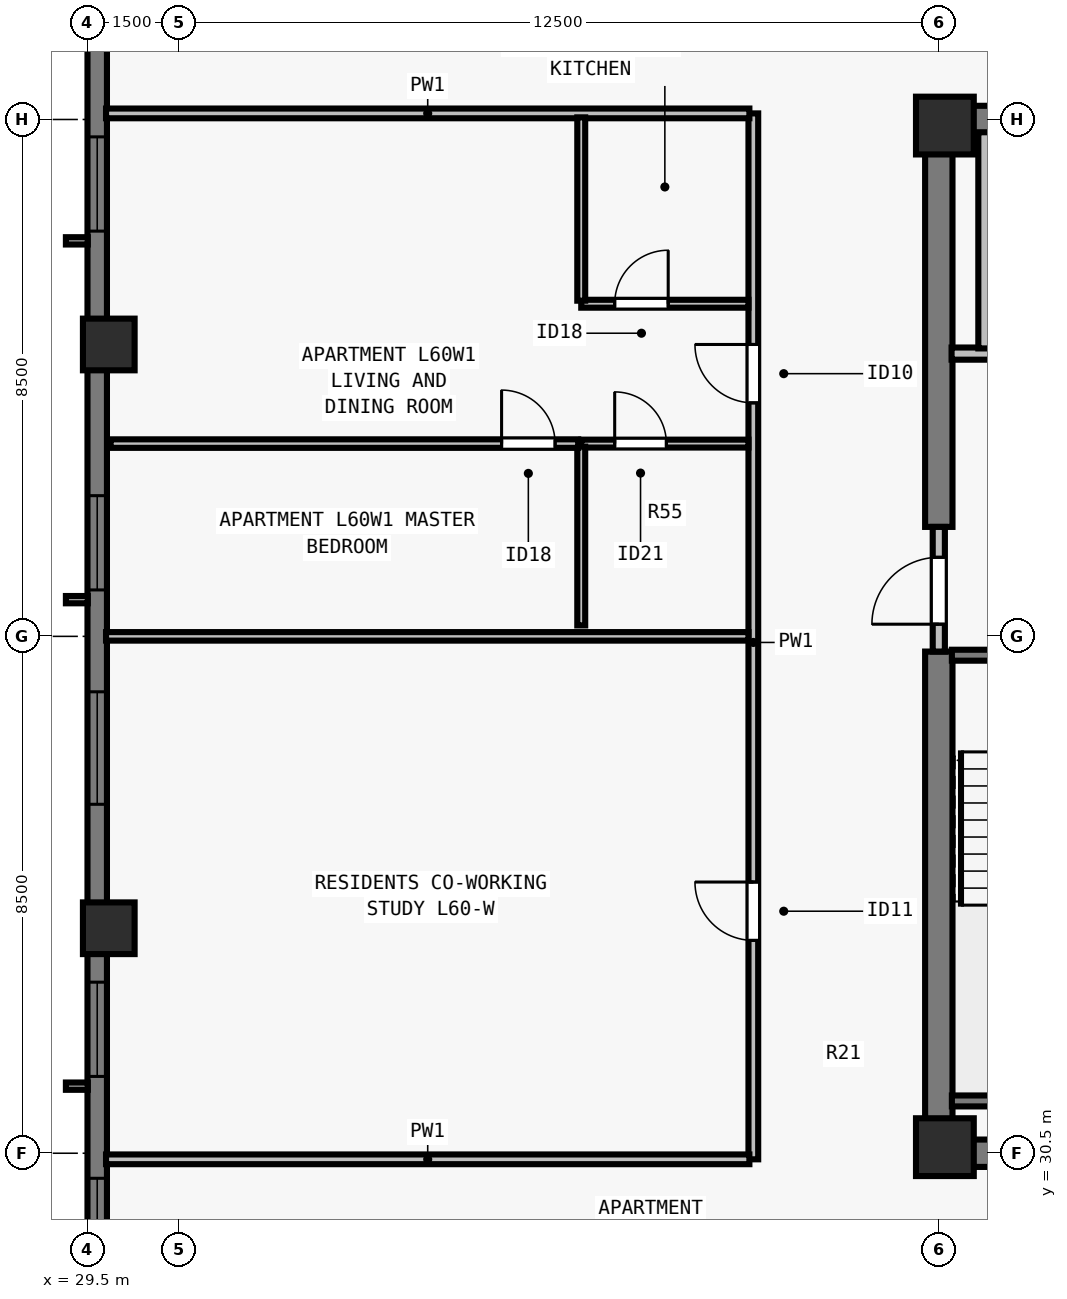
"""IFC4 building model, lengths in metres.
Left out: names, types, materials, properties, quantities, classifications, styles, units other than length and angle.
Written with IfcOpenShell. Run it as: python <this file> out.ifc"""

import sys

from ifc_helpers import new_model, si_unit, direction, frame, frame_2d, origin, origin_2d, place, context, subcontext, project, spatial, rectangle, extrude, element, fill, save


model = new_model("IFC4")
c1 = context("Model", 3, precision=1e-05, world=origin(), true_north=direction((0.0, 1.0)))
c2 = subcontext(c1, "Body", "Model", "MODEL_VIEW")
j1 = project(units=[si_unit("LENGTHUNIT", "METRE"), si_unit("PLANEANGLEUNIT", "RADIAN")], contexts=[c1])
p1 = place(None, origin())
s1 = spatial("IfcSite", under=j1, at=p1, CompositionType="ELEMENT")
p2 = place(p1, origin())
s2 = spatial("IfcBuilding", under=s1, at=p2, CompositionType="ELEMENT")
p3 = place(p2, frame((0.0, 0.0, 220.0)))
s3 = spatial("IfcBuildingStorey", under=s2, at=p3, CompositionType="ELEMENT", Elevation=220.0)
for number, where, z_axis, x_axis in (
    (1, (43.6, 30.6, 0.0), (0.0, 0.0, 1.0), (1.0, 0.0, 0.0)),
    (2, (43.6, 47.4, 0.0), (0.0, 0.0, 1.0), (1.0, 0.0, 0.0)),
):
    element("IfcColumn", number, at=place(p3, frame(where, z_axis=z_axis, x_axis=x_axis)), inside=s3, PredefinedType="COLUMN", context=c2, shape_type="SweptSolid", body=[
        extrude(rectangle(XDim=0.95, YDim=0.95, at=origin_2d()), origin(), (0.0, 0.0, 1.0), 3.5),
    ])
for number, where, z_axis, x_axis in (
    (3, (29.85, 43.8, 0.0), (0.0, 0.0, 1.0), (0.0, 1.0, 0.0)),
    (4, (29.85, 34.2, 0.0), (0.0, 0.0, 1.0), (0.0, 1.0, 0.0)),
):
    element("IfcColumn", number, at=place(p3, frame(where, z_axis=z_axis, x_axis=x_axis)), inside=s3, PredefinedType="COLUMN", context=c2, shape_type="SweptSolid", body=[
        extrude(rectangle(XDim=0.85, YDim=0.85, at=origin_2d()), origin(), (0.0, 0.0, 1.0), 3.5),
    ])
p4 = place(p3, frame((29.66, 21.5, 0.0), z_axis=(0.0, 0.0, 1.0), x_axis=(0.0, 1.0, 0.0)))
e5 = element("IfcWall", 5, at=p4, inside=s3, PredefinedType="SOLIDWALL", context=c2, shape_type="SweptSolid", body=[
    extrude(rectangle(XDim=34.702, YDim=0.32, at=frame_2d((17.351, 0.0))), origin(), (0.0, 0.0, 1.0), 3.29),
])
p5 = place(p4, frame((4.312, 0.0, 0.8)))
e6 = element("IfcOpeningElement", 6, at=p5, cuts=e5, PredefinedType="OPENING", context=c2, shape_type="SweptSolid", body=[
    extrude(rectangle(XDim=1.55, YDim=1.678, at=frame_2d((0.775, 0.839))), frame((0.0, 0.17, 0.0), z_axis=(0.0, -1.0, 0.0), x_axis=(1.0, 0.0, 0.0)), (0.0, 0.0, 1.0), 0.34),
])
p6 = place(p4, frame((6.738, 0.0, 0.8)))
e7 = element("IfcOpeningElement", 7, at=p6, cuts=e5, PredefinedType="OPENING", context=c2, shape_type="SweptSolid", body=[
    extrude(rectangle(XDim=1.85, YDim=1.678, at=frame_2d((0.925, 0.839))), frame((0.0, 0.17, 0.0), z_axis=(0.0, -1.0, 0.0), x_axis=(1.0, 0.0, 0.0)), (0.0, 0.0, 1.0), 0.34),
])
p7 = place(p4, frame((10.263, 0.0, 0.8)))
e8 = element("IfcOpeningElement", 8, at=p7, cuts=e5, PredefinedType="OPENING", context=c2, shape_type="SweptSolid", body=[
    extrude(rectangle(XDim=1.55, YDim=1.678, at=frame_2d((0.775, 0.839))), frame((0.0, 0.17, 0.0), z_axis=(0.0, -1.0, 0.0), x_axis=(1.0, 0.0, 0.0)), (0.0, 0.0, 1.0), 0.34),
])
p8 = place(p4, frame((14.738, 0.0, 0.8)))
e9 = element("IfcOpeningElement", 9, at=p8, cuts=e5, PredefinedType="OPENING", context=c2, shape_type="SweptSolid", body=[
    extrude(rectangle(XDim=1.85, YDim=1.678, at=frame_2d((0.925, 0.839))), frame((0.0, 0.17, 0.0), z_axis=(0.0, -1.0, 0.0), x_axis=(1.0, 0.0, 0.0)), (0.0, 0.0, 1.0), 0.34),
])
p9 = place(p4, frame((18.264, 0.0, 0.8)))
e10 = element("IfcOpeningElement", 10, at=p9, cuts=e5, PredefinedType="OPENING", context=c2, shape_type="SweptSolid", body=[
    extrude(rectangle(XDim=1.55, YDim=1.678, at=frame_2d((0.775, 0.839))), frame((0.0, 0.17, 0.0), z_axis=(0.0, -1.0, 0.0), x_axis=(1.0, 0.0, 0.0)), (0.0, 0.0, 1.0), 0.34),
])
p10 = place(p4, frame((24.164, 0.0, 0.8)))
e11 = element("IfcOpeningElement", 11, at=p10, cuts=e5, PredefinedType="OPENING", context=c2, shape_type="SweptSolid", body=[
    extrude(rectangle(XDim=1.55, YDim=1.678, at=frame_2d((0.775, 0.839))), frame((0.0, 0.17, 0.0), z_axis=(0.0, -1.0, 0.0), x_axis=(1.0, 0.0, 0.0)), (0.0, 0.0, 1.0), 0.34),
])
for number, where, z_axis, x_axis in (
    (12, (43.275, 30.5, 0.0), (0.0, 0.0, 1.0), (1.0, 0.0, 0.0)),
    (13, (43.275, 47.5, 0.0), (0.0, 0.0, 1.0), (1.0, 0.0, 0.0)),
):
    element("IfcWall", number, at=place(p3, frame(where, z_axis=z_axis, x_axis=x_axis)), inside=s3, PredefinedType="SHEAR", context=c2, shape_type="SweptSolid", body=[
        extrude(rectangle(XDim=17.45, YDim=0.45, at=frame_2d((8.725, 0.0))), origin(), (0.0, 0.0, 1.0), 3.29),
    ])
p11 = place(p3, frame((43.5, 30.715, 0.0), z_axis=(0.0, 0.0, 1.0), x_axis=(0.0, 1.0, 0.0)))
e14 = element("IfcWall", 14, at=p11, inside=s3, PredefinedType="SHEAR", context=c2, shape_type="SweptSolid", body=[
    extrude(rectangle(XDim=8.035, YDim=0.45, at=frame_2d((4.018, 0.0))), origin(), (0.0, 0.0, 1.0), 3.29),
])
p12 = place(p3, frame((43.5, 40.8, 0.0), z_axis=(0.0, 0.0, 1.0), x_axis=(0.0, 1.0, 0.0)))
e15 = element("IfcWall", 15, at=p12, inside=s3, PredefinedType="SHEAR", context=c2, shape_type="SweptSolid", body=[
    extrude(rectangle(XDim=6.485, YDim=0.45, at=frame_2d((3.242, 0.0))), origin(), (0.0, 0.0, 1.0), 3.29),
])
p13 = place(p3, frame((43.5, 38.75, 0.0), z_axis=(0.0, 0.0, 1.0), x_axis=(0.0, 1.0, 0.0)))
e16 = element("IfcWall", 16, at=p13, inside=s3, PredefinedType="SOLIDWALL", context=c2, shape_type="SweptSolid", body=[
    extrude(rectangle(XDim=2.05, YDim=0.2, at=frame_2d((1.025, 0.0))), origin(), (0.0, 0.0, 1.0), 3.29),
])
p14 = place(p13, frame((0.45, 0.0, 0.0)))
e17 = element("IfcOpeningElement", 17, at=p14, cuts=e16, PredefinedType="OPENING", context=c2, shape_type="SweptSolid", body=[
    extrude(rectangle(XDim=1.1, YDim=2.15, at=frame_2d((0.55, 1.075))), frame((0.0, 0.11, 0.0), z_axis=(0.0, -1.0, 0.0), x_axis=(1.0, 0.0, 0.0)), (0.0, 0.0, 1.0), 0.22),
])
p15 = place(p3, frame((43.71, 43.65, 0.0), z_axis=(0.0, 0.0, 1.0), x_axis=(1.0, 0.0, 0.0)))
e18 = element("IfcWall", 18, at=p15, inside=s3, PredefinedType="SOLIDWALL", context=c2, shape_type="SweptSolid", body=[
    extrude(rectangle(XDim=3.555, YDim=0.2, at=frame_2d((1.777, 0.0))), origin(), (0.0, 0.0, 1.0), 3.29),
])
p16 = place(p15, frame((1.16, 0.0, 0.0)))
e19 = element("IfcOpeningElement", 19, at=p16, cuts=e18, PredefinedType="OPENING", context=c2, shape_type="SweptSolid", body=[
    extrude(rectangle(XDim=1.1, YDim=2.2, at=frame_2d((0.55, 1.1))), frame((0.0, 0.11, 0.0), z_axis=(0.0, -1.0, 0.0), x_axis=(1.0, 0.0, 0.0)), (0.0, 0.0, 1.0), 0.22),
])
p17 = place(p3, frame((44.25, 43.735, 0.0), z_axis=(0.0, 0.0, 1.0), x_axis=(0.0, 1.0, 0.0)))
e20 = element("IfcWall", 20, at=p17, inside=s3, PredefinedType="SOLIDWALL", context=c2, shape_type="SweptSolid", body=[
    extrude(rectangle(XDim=3.555, YDim=0.2, at=frame_2d((1.777, 0.0))), origin(), (0.0, 0.0, 1.0), 3.29),
])
p18 = place(p3, frame((40.45, 30.4, 0.0), z_axis=(0.0, 0.0, 1.0), x_axis=(0.0, 1.0, 0.0)))
e21 = element("IfcWall", 21, at=p18, inside=s3, PredefinedType="PARTITIONING", context=c2, shape_type="SweptSolid", body=[
    extrude(rectangle(XDim=17.2, YDim=0.16, at=frame_2d((8.6, 0.0))), origin(), (0.0, 0.0, 1.0), 3.29),
])
p19 = place(p18, frame((3.6, 0.0, 0.0)))
e22 = element("IfcOpeningElement", 22, at=p19, cuts=e21, PredefinedType="OPENING", context=c2, shape_type="SweptSolid", body=[
    extrude(rectangle(XDim=0.96, YDim=2.12, at=frame_2d((0.48, 1.06))), frame((0.0, 0.09, 0.0), z_axis=(0.0, -1.0, 0.0), x_axis=(1.0, 0.0, 0.0)), (0.0, 0.0, 1.0), 0.18),
])
p20 = place(p18, frame((12.44, 0.0, 0.0)))
e23 = element("IfcOpeningElement", 23, at=p20, cuts=e21, PredefinedType="OPENING", context=c2, shape_type="SweptSolid", body=[
    extrude(rectangle(XDim=0.96, YDim=2.18, at=frame_2d((0.48, 1.09))), frame((0.0, 0.09, 0.0), z_axis=(0.0, -1.0, 0.0), x_axis=(1.0, 0.0, 0.0)), (0.0, 0.0, 1.0), 0.18),
])
for number, where, z_axis, x_axis in (
    (24, (29.805, 30.4, 0.0), (0.0, 0.0, 1.0), (1.0, 0.0, 0.0)),
    (25, (29.805, 47.6, 0.0), (0.0, 0.0, 1.0), (1.0, 0.0, 0.0)),
):
    element("IfcWall", number, at=place(p3, frame(where, z_axis=z_axis, x_axis=x_axis)), inside=s3, PredefinedType="PARTITIONING", context=c2, shape_type="SweptSolid", body=[
        extrude(rectangle(XDim=10.58, YDim=0.16, at=frame_2d((5.29, 0.0))), origin(), (0.0, 0.0, 1.0), 3.29),
    ])
p21 = place(p3, frame((29.805, 39.0, 0.0), z_axis=(0.0, 0.0, 1.0), x_axis=(1.0, 0.0, 0.0)))
e26 = element("IfcWall", 26, at=p21, inside=s3, PredefinedType="PARTITIONING", context=c2, shape_type="SweptSolid", body=[
    extrude(rectangle(XDim=10.565, YDim=0.14, at=frame_2d((5.283, 0.0))), origin(), (0.0, 0.0, 1.0), 2.958),
])
p22 = place(p3, frame((37.62, 42.17, 0.0), z_axis=(0.0, 0.0, 1.0), x_axis=(1.0, 0.0, 0.0)))
e27 = element("IfcWall", 27, at=p22, inside=s3, PredefinedType="PLUMBINGWALL", context=c2, shape_type="SweptSolid", body=[
    extrude(rectangle(XDim=2.75, YDim=0.13, at=frame_2d((1.375, 0.0))), origin(), (0.0, 0.0, 1.0), 2.958),
])
p23 = place(p22, frame((0.55, 0.0, 0.0)))
e28 = element("IfcOpeningElement", 28, at=p23, cuts=e27, PredefinedType="OPENING", context=c2, shape_type="SweptSolid", body=[
    extrude(rectangle(XDim=0.85, YDim=2.08, at=frame_2d((0.425, 1.04))), frame((0.0, 0.075, 0.0), z_axis=(0.0, -1.0, 0.0), x_axis=(1.0, 0.0, 0.0)), (0.0, 0.0, 1.0), 0.15),
])
p24 = place(p3, frame((37.62, 39.18, 0.0), z_axis=(0.0, 0.0, 1.0), x_axis=(0.0, 1.0, 0.0)))
e29 = element("IfcWall", 29, at=p24, inside=s3, PredefinedType="PLUMBINGWALL", context=c2, shape_type="SweptSolid", body=[
    extrude(rectangle(XDim=2.94, YDim=0.13, at=frame_2d((1.47, 0.0))), origin(), (0.0, 0.0, 1.0), 3.29),
])
p25 = place(p3, frame((37.62, 44.47, 0.0), z_axis=(0.0, 0.0, 1.0), x_axis=(1.0, 0.0, 0.0)))
e30 = element("IfcWall", 30, at=p25, inside=s3, PredefinedType="PLUMBINGWALL", context=c2, shape_type="SweptSolid", body=[
    extrude(rectangle(XDim=2.75, YDim=0.13, at=frame_2d((1.375, 0.0))), origin(), (0.0, 0.0, 1.0), 3.29),
])
p26 = place(p25, frame((0.55, 0.0, 0.0)))
e31 = element("IfcOpeningElement", 31, at=p26, cuts=e30, PredefinedType="OPENING", context=c2, shape_type="SweptSolid", body=[
    extrude(rectangle(XDim=0.88, YDim=2.1, at=frame_2d((0.44, 1.05))), frame((0.0, 0.075, 0.0), z_axis=(0.0, -1.0, 0.0), x_axis=(1.0, 0.0, 0.0)), (0.0, 0.0, 1.0), 0.15),
])
p27 = place(p3, frame((37.62, 44.52, 0.0), z_axis=(0.0, 0.0, 1.0), x_axis=(0.0, 1.0, 0.0)))
e32 = element("IfcWall", 32, at=p27, inside=s3, PredefinedType="PLUMBINGWALL", context=c2, shape_type="SweptSolid", body=[
    extrude(rectangle(XDim=3.015, YDim=0.13, at=frame_2d((1.507, 0.0))), origin(), (0.0, 0.0, 1.0), 3.29),
])
p28 = place(p3, frame((29.88, 42.17, 0.0), z_axis=(0.0, 0.0, 1.0), x_axis=(1.0, 0.0, 0.0)))
e33 = element("IfcWall", 33, at=p28, inside=s3, PredefinedType="PARTITIONING", context=c2, shape_type="SweptSolid", body=[
    extrude(rectangle(XDim=7.69, YDim=0.14, at=frame_2d((3.845, 0.0))), origin(), (0.0, 0.0, 1.0), 3.29),
])
p29 = place(p28, frame((6.43, 0.0, 0.0)))
e34 = element("IfcOpeningElement", 34, at=p29, cuts=e33, PredefinedType="OPENING", context=c2, shape_type="SweptSolid", body=[
    extrude(rectangle(XDim=0.88, YDim=2.1, at=frame_2d((0.44, 1.05))), frame((0.0, 0.08, 0.0), z_axis=(0.0, -1.0, 0.0), x_axis=(1.0, 0.0, 0.0)), (0.0, 0.0, 1.0), 0.16),
])
p30 = place(p3, frame((43.715, 38.69, 0.0), z_axis=(0.0, 0.0, 1.0), x_axis=(1.0, 0.0, 0.0)))
e35 = element("IfcWall", 35, at=p30, inside=s3, PredefinedType="SOLIDWALL", context=c2, shape_type="SweptSolid", body=[
    extrude(rectangle(XDim=3.28, YDim=0.18, at=frame_2d((1.64, 0.0))), origin(), (0.0, 0.0, 1.0), 3.29),
])
p31 = place(p30, frame((1.165, 0.0, 0.0)))
e36 = element("IfcOpeningElement", 36, at=p31, cuts=e35, PredefinedType="OPENING", context=c2, shape_type="SweptSolid", body=[
    extrude(rectangle(XDim=0.95, YDim=2.15, at=frame_2d((0.475, 1.075))), frame((0.0, 0.1, 0.0), z_axis=(0.0, -1.0, 0.0), x_axis=(1.0, 0.0, 0.0)), (0.0, 0.0, 1.0), 0.2),
])
p32 = place(p3, frame((43.715, 31.36, 0.0), z_axis=(0.0, 0.0, 1.0), x_axis=(1.0, 0.0, 0.0)))
e37 = element("IfcWall", 37, at=p32, inside=s3, PredefinedType="SOLIDWALL", context=c2, shape_type="SweptSolid", body=[
    extrude(rectangle(XDim=3.28, YDim=0.18, at=frame_2d((1.64, 0.0))), origin(), (0.0, 0.0, 1.0), 3.29),
])
p33 = place(p6, origin())
e38 = element("IfcWindow", 38, at=p33, inside=s3, PartitioningType="SINGLE_PANEL", PredefinedType="WINDOW", context=c2, shape_type="SweptSolid", body=[
    extrude(rectangle(XDim=1.85, YDim=1.678, at=frame_2d((0.925, 0.839))), frame((0.0, -0.05, 0.0), z_axis=(0.0, -1.0, 0.0), x_axis=(1.0, 0.0, 0.0)), (0.0, 0.0, 1.0), 0.06),
])
fill(e7, e38)
p34 = place(p7, origin())
e39 = element("IfcWindow", 39, at=p34, inside=s3, PartitioningType="SINGLE_PANEL", PredefinedType="WINDOW", context=c2, shape_type="SweptSolid", body=[
    extrude(rectangle(XDim=1.55, YDim=1.678, at=frame_2d((0.775, 0.839))), frame((0.0, -0.05, 0.0), z_axis=(0.0, -1.0, 0.0), x_axis=(1.0, 0.0, 0.0)), (0.0, 0.0, 1.0), 0.06),
])
fill(e8, e39)
p35 = place(p8, origin())
e40 = element("IfcWindow", 40, at=p35, inside=s3, PartitioningType="SINGLE_PANEL", PredefinedType="WINDOW", context=c2, shape_type="SweptSolid", body=[
    extrude(rectangle(XDim=1.85, YDim=1.678, at=frame_2d((0.925, 0.839))), frame((0.0, -0.05, 0.0), z_axis=(0.0, -1.0, 0.0), x_axis=(1.0, 0.0, 0.0)), (0.0, 0.0, 1.0), 0.06),
])
fill(e9, e40)
p36 = place(p9, origin())
e41 = element("IfcWindow", 41, at=p36, inside=s3, PartitioningType="SINGLE_PANEL", PredefinedType="WINDOW", context=c2, shape_type="SweptSolid", body=[
    extrude(rectangle(XDim=1.55, YDim=1.678, at=frame_2d((0.775, 0.839))), frame((0.0, -0.05, 0.0), z_axis=(0.0, -1.0, 0.0), x_axis=(1.0, 0.0, 0.0)), (0.0, 0.0, 1.0), 0.06),
])
fill(e10, e41)
p37 = place(p10, origin())
e42 = element("IfcWindow", 42, at=p37, inside=s3, PartitioningType="SINGLE_PANEL", PredefinedType="WINDOW", context=c2, shape_type="SweptSolid", body=[
    extrude(rectangle(XDim=1.55, YDim=1.678, at=frame_2d((0.775, 0.839))), frame((0.0, -0.05, 0.0), z_axis=(0.0, -1.0, 0.0), x_axis=(1.0, 0.0, 0.0)), (0.0, 0.0, 1.0), 0.06),
])
fill(e11, e42)
p38 = place(p14, origin())
e43 = element("IfcDoor", 43, at=p38, inside=s3, OperationType="SINGLE_SWING_LEFT", PredefinedType="DOOR", context=c2, shape_type="SweptSolid", body=[
    extrude(rectangle(XDim=1.1, YDim=2.15, at=frame_2d((0.55, 1.075))), frame((0.0, 0.025, 0.0), z_axis=(0.0, -1.0, 0.0), x_axis=(1.0, 0.0, 0.0)), (0.0, 0.0, 1.0), 0.05),
])
fill(e17, e43)
p39 = place(p19, origin())
e44 = element("IfcDoor", 44, at=p39, inside=s3, OperationType="SINGLE_SWING_RIGHT", PredefinedType="DOOR", context=c2, shape_type="SweptSolid", body=[
    extrude(rectangle(XDim=0.96, YDim=2.12, at=frame_2d((0.48, 1.06))), frame((0.0, 0.025, 0.0), z_axis=(0.0, -1.0, 0.0), x_axis=(1.0, 0.0, 0.0)), (0.0, 0.0, 1.0), 0.05),
])
fill(e22, e44)
p40 = place(p23, origin())
e45 = element("IfcDoor", 45, at=p40, inside=s3, OperationType="SINGLE_SWING_LEFT", PredefinedType="DOOR", context=c2, shape_type="SweptSolid", body=[
    extrude(rectangle(XDim=0.85, YDim=2.08, at=frame_2d((0.425, 1.04))), frame((0.0, 0.025, 0.0), z_axis=(0.0, -1.0, 0.0), x_axis=(1.0, 0.0, 0.0)), (0.0, 0.0, 1.0), 0.05),
])
fill(e28, e45)
p41 = place(p26, origin())
e46 = element("IfcDoor", 46, at=p41, inside=s3, OperationType="SINGLE_SWING_RIGHT", PredefinedType="DOOR", context=c2, shape_type="SweptSolid", body=[
    extrude(rectangle(XDim=0.88, YDim=2.1, at=frame_2d((0.44, 1.05))), frame((0.0, 0.025, 0.0), z_axis=(0.0, -1.0, 0.0), x_axis=(1.0, 0.0, 0.0)), (0.0, 0.0, 1.0), 0.05),
])
fill(e31, e46)
p42 = place(p29, origin())
e47 = element("IfcDoor", 47, at=p42, inside=s3, OperationType="SINGLE_SWING_LEFT", PredefinedType="DOOR", context=c2, shape_type="SweptSolid", body=[
    extrude(rectangle(XDim=0.88, YDim=2.1, at=frame_2d((0.44, 1.05))), frame((0.0, 0.025, 0.0), z_axis=(0.0, -1.0, 0.0), x_axis=(1.0, 0.0, 0.0)), (0.0, 0.0, 1.0), 0.05),
])
fill(e34, e47)
p43 = place(p20, origin())
e48 = element("IfcDoor", 48, at=p43, inside=s3, OperationType="SINGLE_SWING_RIGHT", PredefinedType="DOOR", context=c2, shape_type="SweptSolid", body=[
    extrude(rectangle(XDim=0.96, YDim=2.18, at=frame_2d((0.48, 1.09))), frame((0.0, 0.025, 0.0), z_axis=(0.0, -1.0, 0.0), x_axis=(1.0, 0.0, 0.0)), (0.0, 0.0, 1.0), 0.05),
])
fill(e23, e48)
save(model, sys.argv[1])
